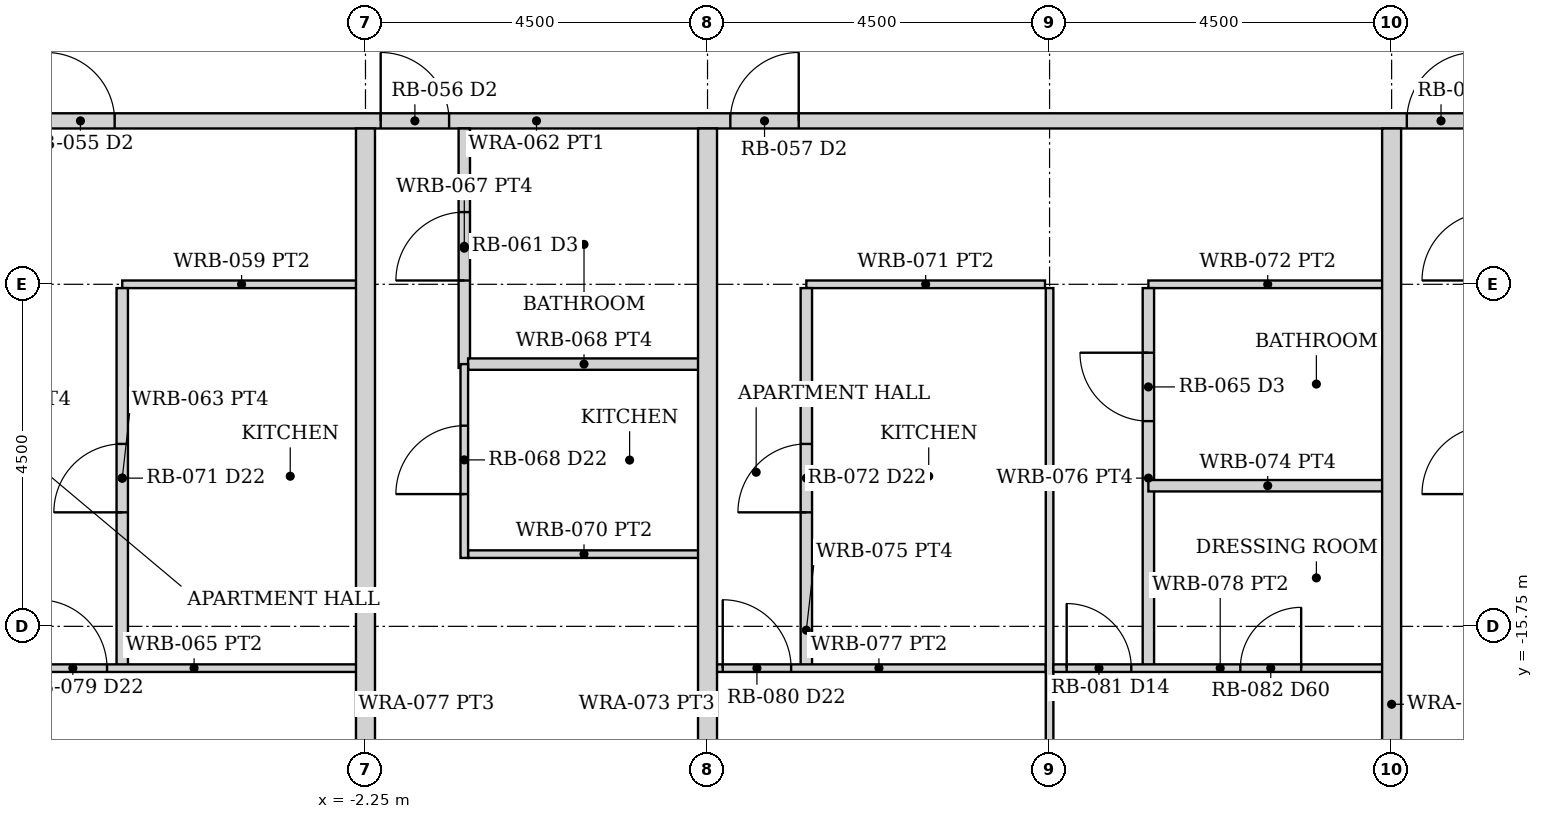
"""IFC4 building model, lengths in metres.
Left out: names, types, materials, properties, quantities, classifications, styles, units other than length and angle.
Written with IfcOpenShell. Run it as: python <this file> out.ifc"""

import sys

from ifc_helpers import new_model, si_unit, direction, frame, frame_2d, origin, place, context, subcontext, project, spatial, rectangle, extrude, element, fill, save


model = new_model("IFC4")
c1 = context("Model", 3, precision=1e-05, world=origin(), true_north=direction((0.0, 1.0)))
c2 = subcontext(c1, "Body", "Model", "MODEL_VIEW")
j1 = project(units=[si_unit("LENGTHUNIT", "METRE"), si_unit("PLANEANGLEUNIT", "RADIAN")], contexts=[c1])
p1 = place(None, origin())
s1 = spatial("IfcSite", under=j1, at=p1, CompositionType="ELEMENT")
p2 = place(p1, origin())
s2 = spatial("IfcBuilding", under=s1, at=p2, CompositionType="ELEMENT")
p3 = place(p2, frame((0.0, 0.0, 37.0)))
s3 = spatial("IfcBuildingStorey", under=s2, at=p3, CompositionType="ELEMENT", Elevation=37.0)
p4 = place(p3, frame((-24.55, -9.1, 0.0), z_axis=(0.0, 0.0, 1.0), x_axis=(1.0, 0.0, 0.0)))
e1 = element("IfcWall", 1, at=p4, inside=s3, PredefinedType="PARTITIONING", context=c2, shape_type="SweptSolid", body=[
    extrude(rectangle(XDim=49.1, YDim=0.2, at=frame_2d((24.55, 0.0))), origin(), (0.0, 0.0, 1.0), 2.373),
])
p5 = place(p4, frame((5.1, 0.0, 0.0)))
e2 = element("IfcOpeningElement", 2, at=p5, cuts=e1, PredefinedType="OPENING", context=c2, shape_type="SweptSolid", body=[
    extrude(rectangle(XDim=0.9, YDim=2.1, at=frame_2d((0.45, 1.05))), frame((0.0, 0.11, 0.0), z_axis=(0.0, -1.0, 0.0), x_axis=(1.0, 0.0, 0.0)), (0.0, 0.0, 1.0), 0.22),
])
p6 = place(p4, frame((9.0, 0.0, 0.0)))
e3 = element("IfcOpeningElement", 3, at=p6, cuts=e1, PredefinedType="OPENING", context=c2, shape_type="SweptSolid", body=[
    extrude(rectangle(XDim=0.9, YDim=2.1, at=frame_2d((0.45, 1.05))), frame((0.0, 0.11, 0.0), z_axis=(0.0, -1.0, 0.0), x_axis=(1.0, 0.0, 0.0)), (0.0, 0.0, 1.0), 0.22),
])
p7 = place(p4, frame((18.1, 0.0, 0.0)))
e4 = element("IfcOpeningElement", 4, at=p7, cuts=e1, PredefinedType="OPENING", context=c2, shape_type="SweptSolid", body=[
    extrude(rectangle(XDim=0.9, YDim=2.1, at=frame_2d((0.45, 1.05))), frame((0.0, 0.11, 0.0), z_axis=(0.0, -1.0, 0.0), x_axis=(1.0, 0.0, 0.0)), (0.0, 0.0, 1.0), 0.22),
])
p8 = place(p4, frame((22.5, 0.0, 0.0)))
e5 = element("IfcOpeningElement", 5, at=p8, cuts=e1, PredefinedType="OPENING", context=c2, shape_type="SweptSolid", body=[
    extrude(rectangle(XDim=0.9, YDim=2.1, at=frame_2d((0.45, 1.05))), frame((0.0, 0.11, 0.0), z_axis=(0.0, -1.0, 0.0), x_axis=(1.0, 0.0, 0.0)), (0.0, 0.0, 1.0), 0.22),
])
p9 = place(p4, frame((27.1, 0.0, 0.0)))
e6 = element("IfcOpeningElement", 6, at=p9, cuts=e1, PredefinedType="OPENING", context=c2, shape_type="SweptSolid", body=[
    extrude(rectangle(XDim=0.9, YDim=2.1, at=frame_2d((0.45, 1.05))), frame((0.0, 0.11, 0.0), z_axis=(0.0, -1.0, 0.0), x_axis=(1.0, 0.0, 0.0)), (0.0, 0.0, 1.0), 0.22),
])
p10 = place(p4, frame((36.0, 0.0, 0.0)))
e7 = element("IfcOpeningElement", 7, at=p10, cuts=e1, PredefinedType="OPENING", context=c2, shape_type="SweptSolid", body=[
    extrude(rectangle(XDim=0.9, YDim=2.1, at=frame_2d((0.45, 1.05))), frame((0.0, 0.11, 0.0), z_axis=(0.0, -1.0, 0.0), x_axis=(1.0, 0.0, 0.0)), (0.0, 0.0, 1.0), 0.22),
])
p11 = place(p4, frame((43.1, 0.0, 0.0)))
e8 = element("IfcOpeningElement", 8, at=p11, cuts=e1, PredefinedType="OPENING", context=c2, shape_type="SweptSolid", body=[
    extrude(rectangle(XDim=0.9, YDim=2.1, at=frame_2d((0.45, 1.05))), frame((0.0, 0.11, 0.0), z_axis=(0.0, -1.0, 0.0), x_axis=(1.0, 0.0, 0.0)), (0.0, 0.0, 1.0), 0.22),
])
p12 = place(p3, frame((-5.45, -11.25, 0.0), z_axis=(0.0, 0.0, 1.0), x_axis=(1.0, 0.0, 0.0)))
e9 = element("IfcWall", 9, at=p12, inside=s3, PredefinedType="PARTITIONING", context=c2, shape_type="SweptSolid", body=[
    extrude(rectangle(XDim=3.14, YDim=0.1, at=frame_2d((1.57, 0.0))), origin(), (0.0, 0.0, 1.0), 2.373),
])
p13 = place(p3, frame((-5.45, -16.3, 0.0), z_axis=(0.0, 0.0, 1.0), x_axis=(0.0, 1.0, 0.0)))
e10 = element("IfcWall", 10, at=p13, inside=s3, PredefinedType="PARTITIONING", context=c2, shape_type="SweptSolid", body=[
    extrude(rectangle(XDim=5.0, YDim=0.15, at=frame_2d((2.5, 0.0))), origin(), (0.0, 0.0, 1.0), 2.373),
])
p14 = place(p13, frame((2.05, 0.0, 0.0)))
e11 = element("IfcOpeningElement", 11, at=p14, cuts=e10, PredefinedType="OPENING", context=c2, shape_type="SweptSolid", body=[
    extrude(rectangle(XDim=0.9, YDim=2.1, at=frame_2d((0.45, 1.05))), frame((0.0, 0.085, 0.0), z_axis=(0.0, -1.0, 0.0), x_axis=(1.0, 0.0, 0.0)), (0.0, 0.0, 1.0), 0.17),
])
p15 = place(p3, frame((-6.7, -16.3, 0.0), z_axis=(0.0, 0.0, 1.0), x_axis=(1.0, 0.0, 0.0)))
e12 = element("IfcWall", 12, at=p15, inside=s3, PredefinedType="PARTITIONING", context=c2, shape_type="SweptSolid", body=[
    extrude(rectangle(XDim=4.39, YDim=0.1, at=frame_2d((2.195, 0.0))), origin(), (0.0, 0.0, 1.0), 2.373),
])
p16 = place(p15, frame((0.15, 0.0, 0.0)))
e13 = element("IfcOpeningElement", 13, at=p16, cuts=e12, PredefinedType="OPENING", context=c2, shape_type="SweptSolid", body=[
    extrude(rectangle(XDim=0.9, YDim=2.1, at=frame_2d((0.45, 1.05))), frame((0.0, 0.06, 0.0), z_axis=(0.0, -1.0, 0.0), x_axis=(1.0, 0.0, 0.0)), (0.0, 0.0, 1.0), 0.12),
])
p17 = place(p3, frame((-0.95, -12.35, 0.0), z_axis=(0.0, 0.0, 1.0), x_axis=(0.0, 1.0, 0.0)))
e14 = element("IfcWall", 14, at=p17, inside=s3, PredefinedType="PARTITIONING", context=c2, shape_type="SweptSolid", body=[
    extrude(rectangle(XDim=3.15, YDim=0.15, at=frame_2d((1.575, 0.0))), origin(), (0.0, 0.0, 1.0), 2.373),
])
p18 = place(p17, frame((1.15, 0.0, 0.0)))
e15 = element("IfcOpeningElement", 15, at=p18, cuts=e14, PredefinedType="OPENING", context=c2, shape_type="SweptSolid", body=[
    extrude(rectangle(XDim=0.9, YDim=2.1, at=frame_2d((0.45, 1.05))), frame((0.0, 0.085, 0.0), z_axis=(0.0, -1.0, 0.0), x_axis=(1.0, 0.0, 0.0)), (0.0, 0.0, 1.0), 0.17),
])
p19 = place(p3, frame((-0.9, -12.3, 0.0), z_axis=(0.0, 0.0, 1.0), x_axis=(1.0, 0.0, 0.0)))
e16 = element("IfcWall", 16, at=p19, inside=s3, PredefinedType="PARTITIONING", context=c2, shape_type="SweptSolid", body=[
    extrude(rectangle(XDim=3.05, YDim=0.15, at=frame_2d((1.525, 0.0))), origin(), (0.0, 0.0, 1.0), 2.373),
])
p20 = place(p3, frame((-0.9, -14.8, 0.0), z_axis=(0.0, 0.0, 1.0), x_axis=(1.0, 0.0, 0.0)))
e17 = element("IfcWall", 17, at=p20, inside=s3, PredefinedType="PARTITIONING", context=c2, shape_type="SweptSolid", body=[
    extrude(rectangle(XDim=3.05, YDim=0.1, at=frame_2d((1.525, 0.0))), origin(), (0.0, 0.0, 1.0), 2.373),
])
p21 = place(p3, frame((-0.95, -14.85, 0.0), z_axis=(0.0, 0.0, 1.0), x_axis=(0.0, 1.0, 0.0)))
e18 = element("IfcWall", 18, at=p21, inside=s3, PredefinedType="PARTITIONING", context=c2, shape_type="SweptSolid", body=[
    extrude(rectangle(XDim=2.55, YDim=0.1, at=frame_2d((1.275, 0.0))), origin(), (0.0, 0.0, 1.0), 2.373),
])
p22 = place(p21, frame((0.84, 0.0, 0.0)))
e19 = element("IfcOpeningElement", 19, at=p22, cuts=e18, PredefinedType="OPENING", context=c2, shape_type="SweptSolid", body=[
    extrude(rectangle(XDim=0.9, YDim=2.1, at=frame_2d((0.45, 1.05))), frame((0.0, 0.06, 0.0), z_axis=(0.0, -1.0, 0.0), x_axis=(1.0, 0.0, 0.0)), (0.0, 0.0, 1.0), 0.12),
])
p23 = place(p3, frame((3.55, -11.25, 0.0), z_axis=(0.0, 0.0, 1.0), x_axis=(1.0, 0.0, 0.0)))
e20 = element("IfcWall", 20, at=p23, inside=s3, PredefinedType="PARTITIONING", context=c2, shape_type="SweptSolid", body=[
    extrude(rectangle(XDim=3.14, YDim=0.1, at=frame_2d((1.57, 0.0))), origin(), (0.0, 0.0, 1.0), 2.373),
])
p24 = place(p3, frame((3.55, -16.3, 0.0), z_axis=(0.0, 0.0, 1.0), x_axis=(0.0, 1.0, 0.0)))
e21 = element("IfcWall", 21, at=p24, inside=s3, PredefinedType="PARTITIONING", context=c2, shape_type="SweptSolid", body=[
    extrude(rectangle(XDim=5.0, YDim=0.15, at=frame_2d((2.5, 0.0))), origin(), (0.0, 0.0, 1.0), 2.373),
])
p25 = place(p24, frame((2.05, 0.0, 0.0)))
e22 = element("IfcOpeningElement", 22, at=p25, cuts=e21, PredefinedType="OPENING", context=c2, shape_type="SweptSolid", body=[
    extrude(rectangle(XDim=0.9, YDim=2.1, at=frame_2d((0.45, 1.05))), frame((0.0, 0.085, 0.0), z_axis=(0.0, -1.0, 0.0), x_axis=(1.0, 0.0, 0.0)), (0.0, 0.0, 1.0), 0.17),
])
p26 = place(p3, frame((2.31, -16.3, 0.0), z_axis=(0.0, 0.0, 1.0), x_axis=(1.0, 0.0, 0.0)))
e23 = element("IfcWall", 23, at=p26, inside=s3, PredefinedType="PARTITIONING", context=c2, shape_type="SweptSolid", body=[
    extrude(rectangle(XDim=4.39, YDim=0.1, at=frame_2d((2.195, 0.0))), origin(), (0.0, 0.0, 1.0), 2.373),
])
p27 = place(p26, frame((0.14, 0.0, 0.0)))
e24 = element("IfcOpeningElement", 24, at=p27, cuts=e23, PredefinedType="OPENING", context=c2, shape_type="SweptSolid", body=[
    extrude(rectangle(XDim=0.9, YDim=2.1, at=frame_2d((0.45, 1.05))), frame((0.0, 0.06, 0.0), z_axis=(0.0, -1.0, 0.0), x_axis=(1.0, 0.0, 0.0)), (0.0, 0.0, 1.0), 0.12),
])
p28 = place(p3, frame((6.75, -24.35, 0.0), z_axis=(0.0, 0.0, 1.0), x_axis=(0.0, 1.0, 0.0)))
e25 = element("IfcWall", 25, at=p28, inside=s3, PredefinedType="PARTITIONING", context=c2, shape_type="SweptSolid", body=[
    extrude(rectangle(XDim=13.05, YDim=0.1, at=frame_2d((6.525, 0.0))), origin(), (0.0, 0.0, 1.0), 2.373),
])
p29 = place(p3, frame((8.05, -11.25, 0.0), z_axis=(0.0, 0.0, 1.0), x_axis=(1.0, 0.0, 0.0)))
e26 = element("IfcWall", 26, at=p29, inside=s3, PredefinedType="PARTITIONING", context=c2, shape_type="SweptSolid", body=[
    extrude(rectangle(XDim=3.14, YDim=0.1, at=frame_2d((1.57, 0.0))), origin(), (0.0, 0.0, 1.0), 2.373),
])
p30 = place(p3, frame((8.05, -16.3, 0.0), z_axis=(0.0, 0.0, 1.0), x_axis=(0.0, 1.0, 0.0)))
e27 = element("IfcWall", 27, at=p30, inside=s3, PredefinedType="PARTITIONING", context=c2, shape_type="SweptSolid", body=[
    extrude(rectangle(XDim=5.0, YDim=0.15, at=frame_2d((2.5, 0.0))), origin(), (0.0, 0.0, 1.0), 2.373),
])
p31 = place(p30, frame((3.25, 0.0, 0.0)))
e28 = element("IfcOpeningElement", 28, at=p31, cuts=e27, PredefinedType="OPENING", context=c2, shape_type="SweptSolid", body=[
    extrude(rectangle(XDim=0.9, YDim=2.1, at=frame_2d((0.45, 1.05))), frame((0.0, 0.085, 0.0), z_axis=(0.0, -1.0, 0.0), x_axis=(1.0, 0.0, 0.0)), (0.0, 0.0, 1.0), 0.17),
])
p32 = place(p3, frame((6.8, -16.3, 0.0), z_axis=(0.0, 0.0, 1.0), x_axis=(1.0, 0.0, 0.0)))
e29 = element("IfcWall", 29, at=p32, inside=s3, PredefinedType="PARTITIONING", context=c2, shape_type="SweptSolid", body=[
    extrude(rectangle(XDim=4.39, YDim=0.1, at=frame_2d((2.195, 0.0))), origin(), (0.0, 0.0, 1.0), 2.373),
])
p33 = place(p32, frame((0.175, 0.0, 0.0)))
e30 = element("IfcOpeningElement", 30, at=p33, cuts=e29, PredefinedType="OPENING", context=c2, shape_type="SweptSolid", body=[
    extrude(rectangle(XDim=0.85, YDim=2.1, at=frame_2d((0.425, 1.05))), frame((0.0, 0.06, 0.0), z_axis=(0.0, -1.0, 0.0), x_axis=(1.0, 0.0, 0.0)), (0.0, 0.0, 1.0), 0.12),
])
p34 = place(p32, frame((2.46, 0.0, 0.0)))
e31 = element("IfcOpeningElement", 31, at=p34, cuts=e29, PredefinedType="OPENING", context=c2, shape_type="SweptSolid", body=[
    extrude(rectangle(XDim=0.8, YDim=2.1, at=frame_2d((0.4, 1.05))), frame((0.0, 0.06, 0.0), z_axis=(0.0, -1.0, 0.0), x_axis=(1.0, 0.0, 0.0)), (0.0, 0.0, 1.0), 0.12),
])
p35 = place(p3, frame((8.05, -13.9, 0.0), z_axis=(0.0, 0.0, 1.0), x_axis=(1.0, 0.0, 0.0)))
e32 = element("IfcWall", 32, at=p35, inside=s3, PredefinedType="PARTITIONING", context=c2, shape_type="SweptSolid", body=[
    extrude(rectangle(XDim=3.14, YDim=0.15, at=frame_2d((1.57, 0.0))), origin(), (0.0, 0.0, 1.0), 2.373),
])
for number, where, z_axis, x_axis in (
    (33, (-2.25, -24.35, 0.0), (0.0, 0.0, 1.0), (0.0, 1.0, 0.0)),
    (34, (2.25, -24.35, 0.0), (0.0, 0.0, 1.0), (0.0, 1.0, 0.0)),
    (35, (11.25, -24.35, 0.0), (0.0, 0.0, 1.0), (0.0, 1.0, 0.0)),
):
    element("IfcWall", number, at=place(p3, frame(where, z_axis=z_axis, x_axis=x_axis)), inside=s3, PredefinedType="PARTITIONING", context=c2, shape_type="SweptSolid", body=[
        extrude(rectangle(XDim=15.15, YDim=0.25, at=frame_2d((7.575, 0.0))), origin(), (0.0, 0.0, 1.0), 2.373),
    ])
p36 = place(p7, origin())
e36 = element("IfcDoor", 36, at=p36, inside=s3, OperationType="SINGLE_SWING_LEFT", PredefinedType="DOOR", context=c2, shape_type="SweptSolid", body=[
    extrude(rectangle(XDim=0.9, YDim=2.1, at=frame_2d((0.45, 1.05))), frame((0.0, 0.025, 0.0), z_axis=(0.0, -1.0, 0.0), x_axis=(1.0, 0.0, 0.0)), (0.0, 0.0, 1.0), 0.05),
])
fill(e4, e36)
p37 = place(p14, origin())
e37 = element("IfcDoor", 37, at=p37, inside=s3, OperationType="SINGLE_SWING_LEFT", PredefinedType="DOOR", context=c2, shape_type="SweptSolid", body=[
    extrude(rectangle(XDim=0.9, YDim=2.1, at=frame_2d((0.45, 1.05))), frame((0.0, 0.025, 0.0), z_axis=(0.0, -1.0, 0.0), x_axis=(1.0, 0.0, 0.0)), (0.0, 0.0, 1.0), 0.05),
])
fill(e11, e37)
p38 = place(p16, origin())
e38 = element("IfcDoor", 38, at=p38, inside=s3, OperationType="SINGLE_SWING_LEFT", PredefinedType="DOOR", context=c2, shape_type="SweptSolid", body=[
    extrude(rectangle(XDim=0.9, YDim=2.1, at=frame_2d((0.45, 1.05))), frame((0.0, 0.025, 0.0), z_axis=(0.0, -1.0, 0.0), x_axis=(1.0, 0.0, 0.0)), (0.0, 0.0, 1.0), 0.05),
])
fill(e13, e38)
p39 = place(p8, origin())
e39 = element("IfcDoor", 39, at=p39, inside=s3, OperationType="SINGLE_SWING_LEFT", PredefinedType="DOOR", context=c2, shape_type="SweptSolid", body=[
    extrude(rectangle(XDim=0.9, YDim=2.1, at=frame_2d((0.45, 1.05))), frame((0.0, 0.025, 0.0), z_axis=(0.0, -1.0, 0.0), x_axis=(1.0, 0.0, 0.0)), (0.0, 0.0, 1.0), 0.05),
])
fill(e5, e39)
p40 = place(p18, origin())
e40 = element("IfcDoor", 40, at=p40, inside=s3, OperationType="SINGLE_SWING_LEFT", PredefinedType="DOOR", context=c2, shape_type="SweptSolid", body=[
    extrude(rectangle(XDim=0.9, YDim=2.1, at=frame_2d((0.45, 1.05))), frame((0.0, 0.025, 0.0), z_axis=(0.0, -1.0, 0.0), x_axis=(1.0, 0.0, 0.0)), (0.0, 0.0, 1.0), 0.05),
])
fill(e15, e40)
p41 = place(p22, origin())
e41 = element("IfcDoor", 41, at=p41, inside=s3, OperationType="SINGLE_SWING_LEFT", PredefinedType="DOOR", context=c2, shape_type="SweptSolid", body=[
    extrude(rectangle(XDim=0.9, YDim=2.1, at=frame_2d((0.45, 1.05))), frame((0.0, 0.025, 0.0), z_axis=(0.0, -1.0, 0.0), x_axis=(1.0, 0.0, 0.0)), (0.0, 0.0, 1.0), 0.05),
])
fill(e19, e41)
p42 = place(p9, origin())
e42 = element("IfcDoor", 42, at=p42, inside=s3, OperationType="SINGLE_SWING_RIGHT", PredefinedType="DOOR", context=c2, shape_type="SweptSolid", body=[
    extrude(rectangle(XDim=0.9, YDim=2.1, at=frame_2d((0.45, 1.05))), frame((0.0, 0.025, 0.0), z_axis=(0.0, -1.0, 0.0), x_axis=(1.0, 0.0, 0.0)), (0.0, 0.0, 1.0), 0.05),
])
fill(e6, e42)
p43 = place(p25, origin())
e43 = element("IfcDoor", 43, at=p43, inside=s3, OperationType="SINGLE_SWING_LEFT", PredefinedType="DOOR", context=c2, shape_type="SweptSolid", body=[
    extrude(rectangle(XDim=0.9, YDim=2.1, at=frame_2d((0.45, 1.05))), frame((0.0, 0.025, 0.0), z_axis=(0.0, -1.0, 0.0), x_axis=(1.0, 0.0, 0.0)), (0.0, 0.0, 1.0), 0.05),
])
fill(e22, e43)
p44 = place(p27, origin())
e44 = element("IfcDoor", 44, at=p44, inside=s3, OperationType="SINGLE_SWING_LEFT", PredefinedType="DOOR", context=c2, shape_type="SweptSolid", body=[
    extrude(rectangle(XDim=0.9, YDim=2.1, at=frame_2d((0.45, 1.05))), frame((0.0, 0.025, 0.0), z_axis=(0.0, -1.0, 0.0), x_axis=(1.0, 0.0, 0.0)), (0.0, 0.0, 1.0), 0.05),
])
fill(e24, e44)
p45 = place(p33, origin())
e45 = element("IfcDoor", 45, at=p45, inside=s3, OperationType="SINGLE_SWING_LEFT", PredefinedType="DOOR", context=c2, shape_type="SweptSolid", body=[
    extrude(rectangle(XDim=0.85, YDim=2.1, at=frame_2d((0.425, 1.05))), frame((0.0, 0.025, 0.0), z_axis=(0.0, -1.0, 0.0), x_axis=(1.0, 0.0, 0.0)), (0.0, 0.0, 1.0), 0.05),
])
fill(e30, e45)
p46 = place(p31, origin())
e46 = element("IfcDoor", 46, at=p46, inside=s3, OperationType="SINGLE_SWING_RIGHT", PredefinedType="DOOR", context=c2, shape_type="SweptSolid", body=[
    extrude(rectangle(XDim=0.9, YDim=2.1, at=frame_2d((0.45, 1.05))), frame((0.0, 0.025, 0.0), z_axis=(0.0, -1.0, 0.0), x_axis=(1.0, 0.0, 0.0)), (0.0, 0.0, 1.0), 0.05),
])
fill(e28, e46)
p47 = place(p34, origin())
e47 = element("IfcDoor", 47, at=p47, inside=s3, OperationType="SINGLE_SWING_RIGHT", PredefinedType="DOOR", context=c2, shape_type="SweptSolid", body=[
    extrude(rectangle(XDim=0.8, YDim=2.1, at=frame_2d((0.4, 1.05))), frame((0.0, 0.025, 0.0), z_axis=(0.0, -1.0, 0.0), x_axis=(1.0, 0.0, 0.0)), (0.0, 0.0, 1.0), 0.05),
])
fill(e31, e47)
p48 = place(p10, origin())
e48 = element("IfcDoor", 48, at=p48, inside=s3, OperationType="SINGLE_SWING_RIGHT", PredefinedType="DOOR", context=c2, shape_type="SweptSolid", body=[
    extrude(rectangle(XDim=0.9, YDim=2.1, at=frame_2d((0.45, 1.05))), frame((0.0, 0.025, 0.0), z_axis=(0.0, -1.0, 0.0), x_axis=(1.0, 0.0, 0.0)), (0.0, 0.0, 1.0), 0.05),
])
fill(e7, e48)
save(model, sys.argv[1])
